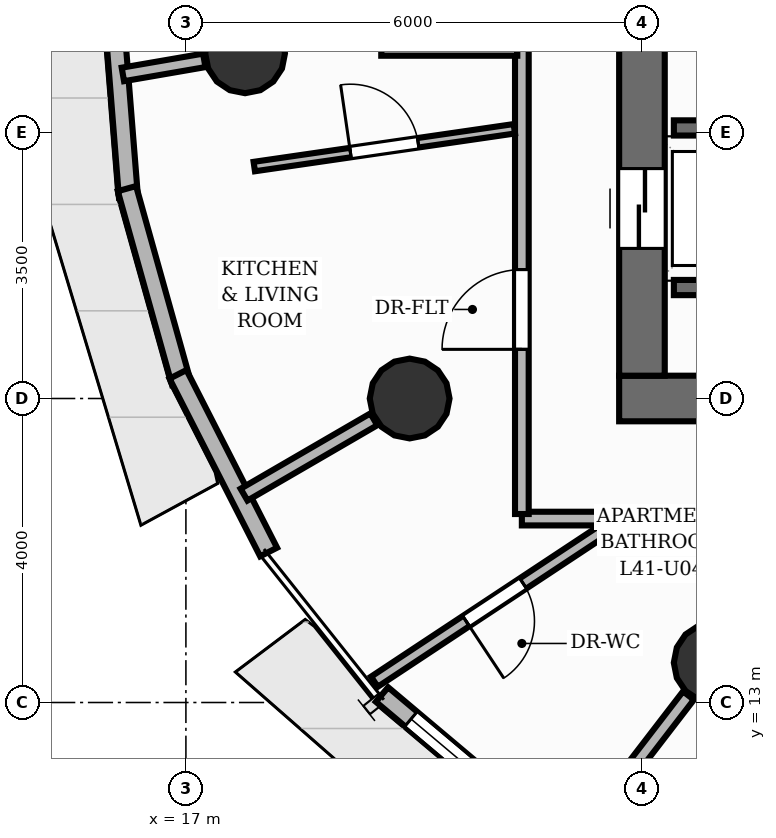
"""IFC4 building model, lengths in metres.
Left out: names, types, materials, properties, quantities, classifications, styles, units other than length and angle.
Written with IfcOpenShell. Run it as: python <this file> out.ifc"""

import sys

from ifc_helpers import new_model, si_unit, direction, frame, frame_2d, origin, origin_2d, place, context, subcontext, project, spatial, rectangle, circle, extrude, element, fill, save


model = new_model("IFC4")
c1 = context("Model", 3, precision=1e-05, world=origin(), true_north=direction((0.0, 1.0)))
c2 = subcontext(c1, "Body", "Model", "MODEL_VIEW")
j1 = project(units=[si_unit("LENGTHUNIT", "METRE"), si_unit("PLANEANGLEUNIT", "RADIAN")], contexts=[c1])
p1 = place(None, origin())
s1 = spatial("IfcSite", under=j1, at=p1, CompositionType="ELEMENT")
p2 = place(p1, origin())
s2 = spatial("IfcBuilding", under=s1, at=p2, CompositionType="ELEMENT")
p3 = place(p2, frame((0.0, 0.0, 139.36)))
s3 = spatial("IfcBuildingStorey", under=s2, at=p3, CompositionType="ELEMENT", Elevation=139.36)
p4 = place(p3, frame((22.7, 17.0, 0.0), z_axis=(0.0, 0.0, 1.0), x_axis=(1.0, 0.0, 0.0)))
e1 = element("IfcWall", 1, at=p4, inside=s3, PredefinedType="SHEAR", context=c2, shape_type="SweptSolid", body=[
    extrude(rectangle(XDim=15.1, YDim=0.6, at=frame_2d((7.55, 0.0))), origin(), (0.0, 0.0, 1.0), 3.2),
])
p5 = place(p4, frame((5.8, 0.0, 0.0)))
e2 = element("IfcOpeningElement", 2, at=p5, cuts=e1, PredefinedType="OPENING", context=c2, shape_type="SweptSolid", body=[
    extrude(rectangle(XDim=1.1, YDim=2.15, at=frame_2d((0.55, 1.075))), frame((0.0, 0.31, 0.0), z_axis=(0.0, -1.0, 0.0), x_axis=(1.0, 0.0, 0.0)), (0.0, 0.0, 1.0), 0.62),
])
p6 = place(p4, frame((9.35, 0.0, 0.0)))
e3 = element("IfcOpeningElement", 3, at=p6, cuts=e1, PredefinedType="OPENING", context=c2, shape_type="SweptSolid", body=[
    extrude(rectangle(XDim=0.9, YDim=2.1, at=frame_2d((0.45, 1.05))), frame((0.0, 0.31, 0.0), z_axis=(0.0, -1.0, 0.0), x_axis=(1.0, 0.0, 0.0)), (0.0, 0.0, 1.0), 0.62),
])
p7 = place(p3, frame((23.0, 17.3, 0.0), z_axis=(0.0, 0.0, 1.0), x_axis=(0.0, 1.0, 0.0)))
e4 = element("IfcWall", 4, at=p7, inside=s3, PredefinedType="SHEAR", context=c2, shape_type="SweptSolid", body=[
    extrude(rectangle(XDim=13.4, YDim=0.6, at=frame_2d((6.7, 0.0))), origin(), (0.0, 0.0, 1.0), 3.2),
])
p8 = place(p7, frame((1.675, 0.0, 0.0)))
e5 = element("IfcOpeningElement", 5, at=p8, cuts=e4, PredefinedType="OPENING", context=c2, shape_type="SweptSolid", body=[
    extrude(rectangle(XDim=1.05, YDim=2.15, at=frame_2d((0.525, 1.075))), frame((0.0, 0.31, 0.0), z_axis=(0.0, -1.0, 0.0), x_axis=(1.0, 0.0, 0.0)), (0.0, 0.0, 1.0), 0.62),
])
p9 = place(p7, frame((6.175, 0.0, 0.0)))
e6 = element("IfcOpeningElement", 6, at=p9, cuts=e4, PredefinedType="OPENING", context=c2, shape_type="SweptSolid", body=[
    extrude(rectangle(XDim=1.05, YDim=2.15, at=frame_2d((0.525, 1.075))), frame((0.0, 0.31, 0.0), z_axis=(0.0, -1.0, 0.0), x_axis=(1.0, 0.0, 0.0)), (0.0, 0.0, 1.0), 0.62),
])
p10 = place(p7, frame((10.675, 0.0, 0.0)))
e7 = element("IfcOpeningElement", 7, at=p10, cuts=e4, PredefinedType="OPENING", context=c2, shape_type="SweptSolid", body=[
    extrude(rectangle(XDim=1.05, YDim=2.15, at=frame_2d((0.525, 1.075))), frame((0.0, 0.31, 0.0), z_axis=(0.0, -1.0, 0.0), x_axis=(1.0, 0.0, 0.0)), (0.0, 0.0, 1.0), 0.62),
])
for number, where, z_axis, x_axis in (
    (8, (17.779, 21.542, 0.0), (0.0, 0.0, 1.0), (1.0, 0.0, 0.0)),
    (9, (19.944, 17.0, 0.0), (0.0, 0.0, 1.0), (1.0, 0.0, 0.0)),
    (10, (23.944, 13.523, 0.0), (0.0, 0.0, 1.0), (1.0, 0.0, 0.0)),
):
    element("IfcColumn", number, at=place(p3, frame(where, z_axis=z_axis, x_axis=x_axis)), inside=s3, PredefinedType="COLUMN", context=c2, shape_type="SweptSolid", body=[
        extrude(circle(Radius=0.525, at=origin_2d()), origin(), (0.0, 0.0, 1.0), 3.2),
    ])
p11 = place(p3, frame((16.244, 19.65, 0.0), z_axis=(0.0, 0.0, 1.0), x_axis=(-0.079420906371, 0.996841170714, 0.0)))
e11 = element("IfcWall", 11, at=p11, inside=s3, PredefinedType="SOLIDWALL", context=c2, shape_type="SweptSolid", body=[
    extrude(rectangle(XDim=2.693, YDim=0.25, at=frame_2d((1.346, 0.0))), origin(), (0.0, 0.0, 1.0), 2.96),
])
p12 = place(p3, frame((16.938, 17.211, 0.0), z_axis=(0.0, 0.0, 1.0), x_axis=(-0.269469206067, 0.963009006698, 0.0)))
e12 = element("IfcWall", 12, at=p12, inside=s3, PredefinedType="SOLIDWALL", context=c2, shape_type="SweptSolid", body=[
    extrude(rectangle(XDim=2.648, YDim=0.25, at=frame_2d((1.324, 0.0))), origin(), (0.0, 0.0, 1.0), 2.96),
])
p13 = place(p3, frame((18.088, 14.98, 0.0), z_axis=(0.0, 0.0, 1.0), x_axis=(-0.454196134835, 0.890901717981, 0.0)))
e13 = element("IfcWall", 13, at=p13, inside=s3, PredefinedType="SOLIDWALL", context=c2, shape_type="SweptSolid", body=[
    extrude(rectangle(XDim=2.624, YDim=0.25, at=frame_2d((1.312, 0.0))), origin(), (0.0, 0.0, 1.0), 2.96),
])
p14 = place(p3, frame((21.605, 11.399, 0.0), z_axis=(0.0, 0.0, 1.0), x_axis=(-0.764825125467, 0.644237943197, 0.0)))
e14 = element("IfcWall", 14, at=p14, inside=s3, PredefinedType="SOLIDWALL", context=c2, shape_type="SweptSolid", body=[
    extrude(rectangle(XDim=2.648, YDim=0.25, at=frame_2d((1.324, 0.0))), origin(), (0.0, 0.0, 1.0), 2.96),
])
p15 = place(p14, frame((0.499, 0.0, 0.85)))
e15 = element("IfcOpeningElement", 15, at=p15, cuts=e14, PredefinedType="OPENING", context=c2, shape_type="SweptSolid", body=[
    extrude(rectangle(XDim=1.65, YDim=1.55, at=frame_2d((0.825, 0.775))), frame((0.0, 0.135, 0.0), z_axis=(0.0, -1.0, 0.0), x_axis=(1.0, 0.0, 0.0)), (0.0, 0.0, 1.0), 0.27),
])
for number, where, z_axis, x_axis in (
    (16, (23.42, 18.46, 0.0), (0.0, 0.0, 1.0), (1.0, 0.0, 0.0)),
    (17, (23.42, 20.56, 0.0), (0.0, 0.0, 1.0), (1.0, 0.0, 0.0)),
):
    element("IfcWall", number, at=place(p3, frame(where, z_axis=z_axis, x_axis=x_axis)), inside=s3, PredefinedType="SHEAR", context=c2, shape_type="SweptSolid", body=[
        extrude(rectangle(XDim=1.71, YDim=0.2, at=frame_2d((0.855, 0.0))), origin(), (0.0, 0.0, 1.0), 3.2),
    ])
p16 = place(p3, frame((17.242, 21.449, 0.0), z_axis=(0.0, 0.0, 1.0), x_axis=(-0.985361391556, -0.170478526599, 0.0)))
e18 = element("IfcWall", 18, at=p16, inside=s3, PredefinedType="PARTITIONING", context=c2, shape_type="SweptSolid", body=[
    extrude(rectangle(XDim=1.087, YDim=0.18, at=frame_2d((0.543, 0.0))), origin(), (0.0, 0.0, 1.0), 2.336),
])
p17 = place(p3, frame((19.472, 16.726, 0.0), z_axis=(0.0, 0.0, 1.0), x_axis=(-0.864844369658, -0.502040054448, 0.0)))
e19 = element("IfcWall", 19, at=p17, inside=s3, PredefinedType="PARTITIONING", context=c2, shape_type="SweptSolid", body=[
    extrude(rectangle(XDim=1.974, YDim=0.18, at=frame_2d((0.987, 0.0))), origin(), (0.0, 0.0, 1.0), 2.336),
])
p18 = place(p3, frame((23.612, 13.092, 0.0), z_axis=(0.0, 0.0, 1.0), x_axis=(-0.609549509747, -0.79274800231, 0.0)))
e20 = element("IfcWall", 20, at=p18, inside=s3, PredefinedType="PARTITIONING", context=c2, shape_type="SweptSolid", body=[
    extrude(rectangle(XDim=2.415, YDim=0.18, at=frame_2d((1.208, 0.0))), origin(), (0.0, 0.0, 1.0), 2.336),
])
p19 = place(p3, frame((39.08, 15.42, 0.0), z_axis=(0.0, 0.0, 1.0), x_axis=(-1.0, 0.0, 0.0)))
e21 = element("IfcWall", 21, at=p19, inside=s3, PredefinedType="PARTITIONING", context=c2, shape_type="SweptSolid", body=[
    extrude(rectangle(XDim=16.39, YDim=0.18, at=frame_2d((8.195, 0.0))), origin(), (0.0, 0.0, 1.0), 2.955),
])
p20 = place(p19, frame((4.593, 0.0, 0.0)))
e22 = element("IfcOpeningElement", 22, at=p20, cuts=e21, PredefinedType="OPENING", context=c2, shape_type="SweptSolid", body=[
    extrude(rectangle(XDim=1.05, YDim=2.15, at=frame_2d((0.525, 1.075))), frame((0.0, 0.1, 0.0), z_axis=(0.0, -1.0, 0.0), x_axis=(1.0, 0.0, 0.0)), (0.0, 0.0, 1.0), 0.2),
])
p21 = place(p3, frame((22.746, 15.42, 0.0), z_axis=(0.0, 0.0, 1.0), x_axis=(-1.0, 0.0, 0.0)))
e23 = element("IfcWall", 23, at=p21, inside=s3, PredefinedType="PARTITIONING", context=c2, shape_type="SweptSolid", body=[
    extrude(rectangle(XDim=1.326, YDim=0.18, at=frame_2d((0.663, 0.0))), origin(), (0.0, 0.0, 1.0), 2.955),
])
p22 = place(p3, frame((21.42, 15.48, 0.0), z_axis=(0.0, 0.0, 1.0), x_axis=(0.0, 1.0, 0.0)))
e24 = element("IfcWall", 24, at=p22, inside=s3, PredefinedType="PARTITIONING", context=c2, shape_type="SweptSolid", body=[
    extrude(rectangle(XDim=6.12, YDim=0.18, at=frame_2d((3.06, 0.0))), origin(), (0.0, 0.0, 1.0), 2.955),
])
p23 = place(p22, frame((2.167, 0.0, 0.0)))
e25 = element("IfcOpeningElement", 25, at=p23, cuts=e24, PredefinedType="OPENING", context=c2, shape_type="SweptSolid", body=[
    extrude(rectangle(XDim=1.05, YDim=2.15, at=frame_2d((0.525, 1.075))), frame((0.0, 0.1, 0.0), z_axis=(0.0, -1.0, 0.0), x_axis=(1.0, 0.0, 0.0)), (0.0, 0.0, 1.0), 0.2),
])
p24 = place(p3, frame((21.36, 21.6, 0.0), z_axis=(0.0, 0.0, 1.0), x_axis=(-1.0, 0.0, 0.0)))
e26 = element("IfcWall", 26, at=p24, inside=s3, PredefinedType="PARTITIONING", context=c2, shape_type="SweptSolid", body=[
    extrude(rectangle(XDim=1.79, YDim=0.18, at=frame_2d((0.895, 0.0))), origin(), (0.0, 0.0, 1.0), 2.336),
])
p25 = place(p3, frame((22.643, 15.365, 0.0), z_axis=(0.0, 0.0, 1.0), x_axis=(-0.83413433024, -0.551561346647, 0.0)))
e27 = element("IfcWall", 27, at=p25, inside=s3, PredefinedType="PLUMBINGWALL", context=c2, shape_type="SweptSolid", body=[
    extrude(rectangle(XDim=3.792, YDim=0.16, at=frame_2d((1.896, 0.0))), origin(), (0.0, 0.0, 1.0), 2.955),
])
p26 = place(p25, frame((1.446, 0.0, 0.0)))
e28 = element("IfcOpeningElement", 28, at=p26, cuts=e27, PredefinedType="OPENING", context=c2, shape_type="SweptSolid", body=[
    extrude(rectangle(XDim=0.9, YDim=2.1, at=frame_2d((0.45, 1.05))), frame((0.0, 0.09, 0.0), z_axis=(0.0, -1.0, 0.0), x_axis=(1.0, 0.0, 0.0)), (0.0, 0.0, 1.0), 0.18),
])
p27 = place(p3, frame((17.899, 20.052, 0.0), z_axis=(0.0, 0.0, 1.0), x_axis=(0.989601977359, 0.143832980941, 0.0)))
e29 = element("IfcWall", 29, at=p27, inside=s3, PredefinedType="PARTITIONING", context=c2, shape_type="SweptSolid", body=[
    extrude(rectangle(XDim=3.458, YDim=0.125, at=frame_2d((1.729, 0.0))), origin(), (0.0, 0.0, 1.0), 2.692),
])
p28 = place(p27, frame((1.279, 0.0, 0.0)))
e30 = element("IfcOpeningElement", 30, at=p28, cuts=e29, PredefinedType="OPENING", context=c2, shape_type="SweptSolid", body=[
    extrude(rectangle(XDim=0.9, YDim=2.1, at=frame_2d((0.45, 1.05))), frame((0.0, 0.073, 0.0), z_axis=(0.0, -1.0, 0.0), x_axis=(1.0, 0.0, 0.0)), (0.0, 0.0, 1.0), 0.145),
])
p29 = place(p15, origin())
e31 = element("IfcWindow", 31, at=p29, inside=s3, PartitioningType="SINGLE_PANEL", PredefinedType="WINDOW", context=c2, shape_type="SweptSolid", body=[
    extrude(rectangle(XDim=1.65, YDim=1.55, at=frame_2d((0.825, 0.775))), frame((0.0, 0.03, 0.0), z_axis=(0.0, -1.0, 0.0), x_axis=(1.0, 0.0, 0.0)), (0.0, 0.0, 1.0), 0.06),
])
fill(e15, e31)
p30 = place(p8, origin())
e32 = element("IfcDoor", 32, at=p30, inside=s3, OperationType="DOUBLE_DOOR_SLIDING", PredefinedType="DOOR", context=c2, shape_type="SweptSolid", body=[
    extrude(rectangle(XDim=1.05, YDim=2.15, at=frame_2d((0.525, 1.075))), frame((0.0, 0.025, 0.0), z_axis=(0.0, -1.0, 0.0), x_axis=(1.0, 0.0, 0.0)), (0.0, 0.0, 1.0), 0.05),
])
fill(e5, e32)
p31 = place(p23, origin())
e33 = element("IfcDoor", 33, at=p31, inside=s3, OperationType="SINGLE_SWING_LEFT", PredefinedType="DOOR", context=c2, shape_type="SweptSolid", body=[
    extrude(rectangle(XDim=1.05, YDim=2.15, at=frame_2d((0.525, 1.075))), frame((0.0, 0.025, 0.0), z_axis=(0.0, -1.0, 0.0), x_axis=(1.0, 0.0, 0.0)), (0.0, 0.0, 1.0), 0.05),
])
fill(e25, e33)
p32 = place(p26, origin())
e34 = element("IfcDoor", 34, at=p32, inside=s3, OperationType="SINGLE_SWING_RIGHT", PredefinedType="DOOR", context=c2, shape_type="SweptSolid", body=[
    extrude(rectangle(XDim=0.9, YDim=2.1, at=frame_2d((0.45, 1.05))), frame((0.0, 0.025, 0.0), z_axis=(0.0, -1.0, 0.0), x_axis=(1.0, 0.0, 0.0)), (0.0, 0.0, 1.0), 0.05),
])
fill(e28, e34)
p33 = place(p28, origin())
e35 = element("IfcDoor", 35, at=p33, inside=s3, OperationType="SINGLE_SWING_LEFT", PredefinedType="DOOR", context=c2, shape_type="SweptSolid", body=[
    extrude(rectangle(XDim=0.9, YDim=2.1, at=frame_2d((0.45, 1.05))), frame((0.0, 0.025, 0.0), z_axis=(0.0, -1.0, 0.0), x_axis=(1.0, 0.0, 0.0)), (0.0, 0.0, 1.0), 0.05),
])
fill(e30, e35)
save(model, sys.argv[1])
